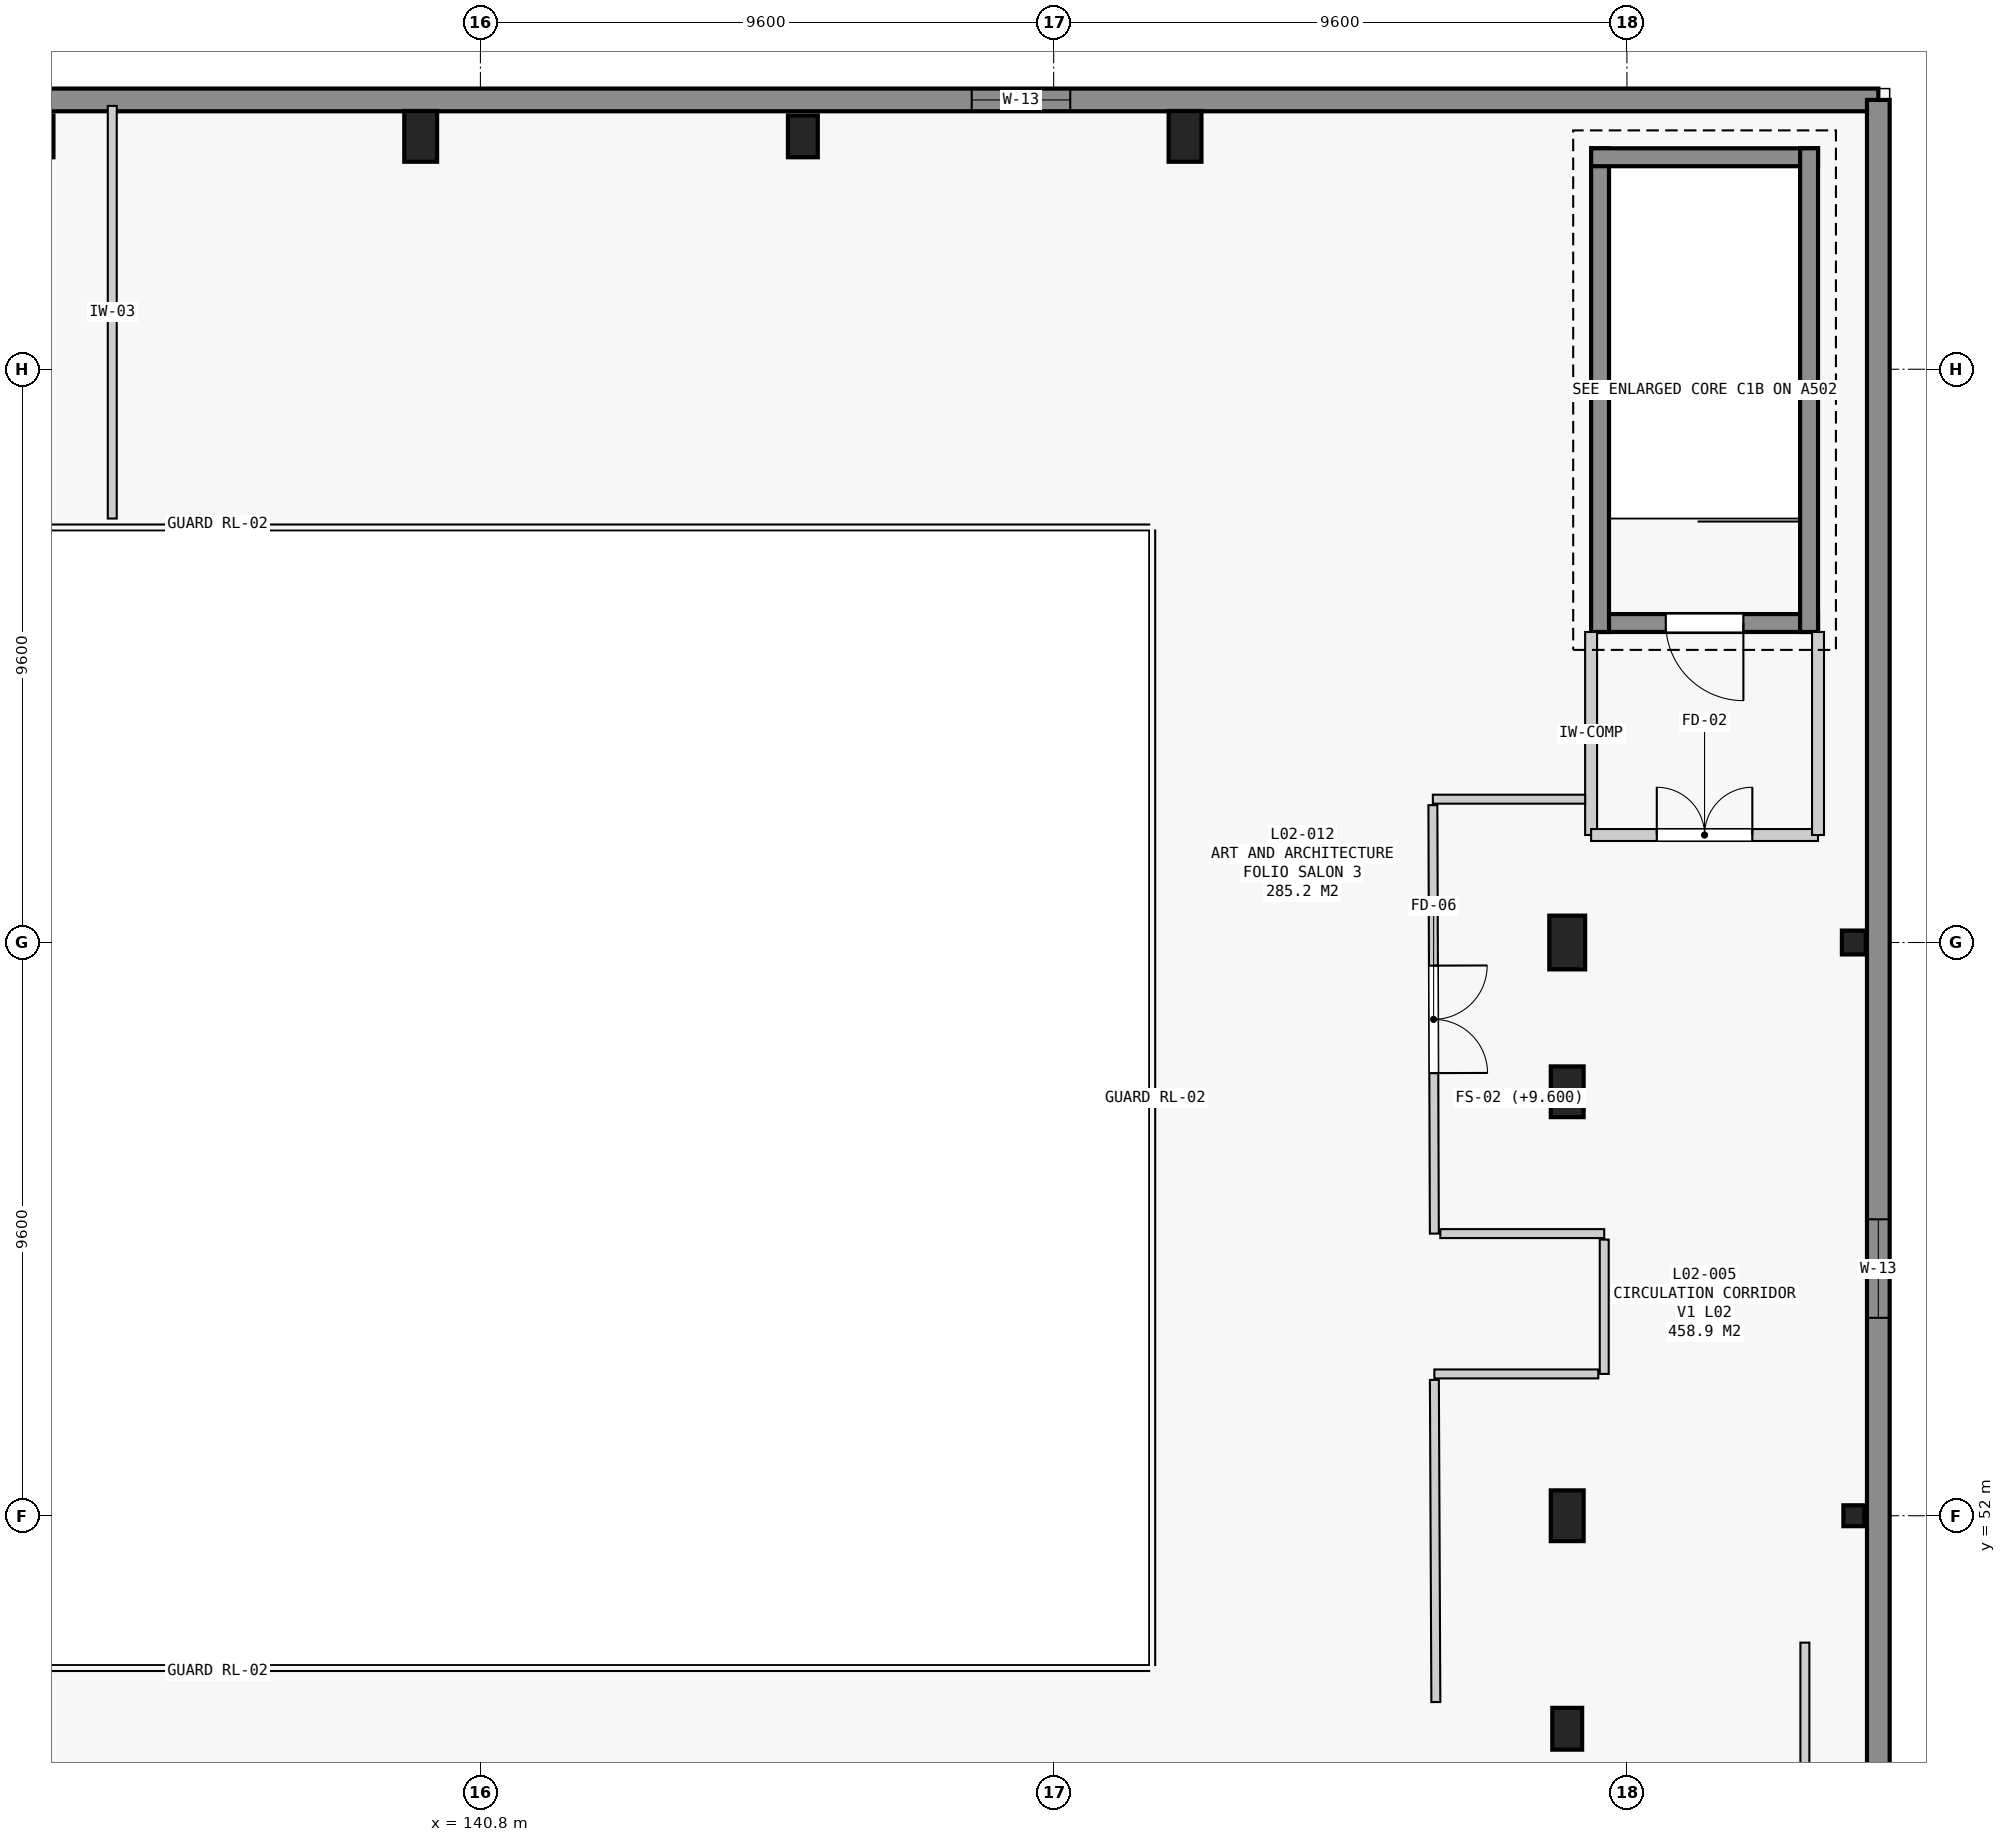
"""IFC4 building model, lengths in metres.
Left out: names, types, materials, properties, quantities, classifications, styles, units other than length and angle.
Written with IfcOpenShell. Run it as: python <this file> out.ifc"""

import sys

from ifc_helpers import new_model, si_unit, direction, frame, frame_2d, origin, origin_2d, place, context, subcontext, project, spatial, rectangle, extrude, element, fill, save


model = new_model("IFC4")
c1 = context("Model", 3, precision=1e-05, world=origin(), true_north=direction((0.0, 1.0)))
c2 = subcontext(c1, "Body", "Model", "MODEL_VIEW")
j1 = project(units=[si_unit("LENGTHUNIT", "METRE"), si_unit("PLANEANGLEUNIT", "RADIAN")], contexts=[c1])
p1 = place(None, origin())
s1 = spatial("IfcSite", under=j1, at=p1, CompositionType="ELEMENT")
p2 = place(p1, origin())
s2 = spatial("IfcBuilding", under=s1, at=p2, CompositionType="ELEMENT")
p3 = place(p2, frame((0.0, 0.0, 9.6)))
s3 = spatial("IfcBuildingStorey", under=s2, at=p3, CompositionType="ELEMENT", Elevation=9.6)
p4 = place(p3, frame((159.0, 52.0, 0.0), z_axis=(0.0, 0.0, 1.0), x_axis=(1.0, 0.0, 0.0)))
e1 = element("IfcColumn", 1, at=p4, inside=s3, PredefinedType="COLUMN", context=c2, shape_type="SweptSolid", body=[
    extrude(rectangle(XDim=0.55, YDim=0.85, at=origin_2d()), origin(), (0.0, 0.0, 1.0), 4.6),
])
p5 = place(p3, frame((159.0, 61.6, 0.0), z_axis=(0.0, 0.0, 1.0), x_axis=(1.0, 0.0, 0.0)))
e2 = element("IfcColumn", 2, at=p5, inside=s3, PredefinedType="COLUMN", context=c2, shape_type="SweptSolid", body=[
    extrude(rectangle(XDim=0.6, YDim=0.9, at=origin_2d()), origin(), (0.0, 0.0, 1.0), 4.6),
])
p6 = place(p3, frame((163.8, 52.0, 0.0), z_axis=(0.0, 0.0, 1.0), x_axis=(1.0, 0.0, 0.0)))
e3 = element("IfcColumn", 3, at=p6, inside=s3, PredefinedType="COLUMN", context=c2, shape_type="SweptSolid", body=[
    extrude(rectangle(XDim=0.35, YDim=0.35, at=origin_2d()), origin(), (0.0, 0.0, 1.0), 4.2),
])
p7 = place(p3, frame((163.8, 61.6, 0.0), z_axis=(0.0, 0.0, 1.0), x_axis=(1.0, 0.0, 0.0)))
e4 = element("IfcColumn", 4, at=p7, inside=s3, PredefinedType="COLUMN", context=c2, shape_type="SweptSolid", body=[
    extrude(rectangle(XDim=0.4, YDim=0.4, at=origin_2d()), origin(), (0.0, 0.0, 1.0), 4.2),
])
p8 = place(p3, frame((133.4, 75.1, 0.0), z_axis=(0.0, 0.0, 1.0), x_axis=(1.0, 0.0, 0.0)))
e5 = element("IfcColumn", 5, at=p8, inside=s3, PredefinedType="COLUMN", context=c2, shape_type="SweptSolid", body=[
    extrude(rectangle(XDim=0.5, YDim=0.7, at=origin_2d()), origin(), (0.0, 0.0, 1.0), 4.6),
])
p9 = place(p3, frame((139.8, 75.1, 0.0), z_axis=(0.0, 0.0, 1.0), x_axis=(1.0, 0.0, 0.0)))
e6 = element("IfcColumn", 6, at=p9, inside=s3, PredefinedType="COLUMN", context=c2, shape_type="SweptSolid", body=[
    extrude(rectangle(XDim=0.55, YDim=0.85, at=origin_2d()), origin(), (0.0, 0.0, 1.0), 4.6),
])
p10 = place(p3, frame((146.2, 75.1, 0.0), z_axis=(0.0, 0.0, 1.0), x_axis=(1.0, 0.0, 0.0)))
e7 = element("IfcColumn", 7, at=p10, inside=s3, PredefinedType="COLUMN", context=c2, shape_type="SweptSolid", body=[
    extrude(rectangle(XDim=0.5, YDim=0.7, at=origin_2d()), origin(), (0.0, 0.0, 1.0), 4.6),
])
p11 = place(p3, frame((152.6, 75.1, 0.0), z_axis=(0.0, 0.0, 1.0), x_axis=(1.0, 0.0, 0.0)))
e8 = element("IfcColumn", 8, at=p11, inside=s3, PredefinedType="COLUMN", context=c2, shape_type="SweptSolid", body=[
    extrude(rectangle(XDim=0.55, YDim=0.85, at=origin_2d()), origin(), (0.0, 0.0, 1.0), 4.6),
])
p12 = place(p3, frame((159.0, 48.433, 0.0), z_axis=(0.0, 0.0, 1.0), x_axis=(1.0, 0.0, 0.0)))
e9 = element("IfcColumn", 9, at=p12, inside=s3, PredefinedType="COLUMN", context=c2, shape_type="SweptSolid", body=[
    extrude(rectangle(XDim=0.5, YDim=0.7, at=origin_2d()), origin(), (0.0, 0.0, 1.0), 4.6),
])
p13 = place(p3, frame((159.0, 59.1, 0.0), z_axis=(0.0, 0.0, 1.0), x_axis=(1.0, 0.0, 0.0)))
e10 = element("IfcColumn", 10, at=p13, inside=s3, PredefinedType="COLUMN", context=c2, shape_type="SweptSolid", body=[
    extrude(rectangle(XDim=0.55, YDim=0.85, at=origin_2d()), origin(), (0.0, 0.0, 1.0), 4.6),
])
p14 = place(p3, frame((114.923, 75.71, 0.0), z_axis=(0.0, 0.0, 1.0), x_axis=(1.0, 0.0, 0.0)))
e11 = element("IfcWall", 11, at=p14, inside=s3, PredefinedType="STANDARD", context=c2, shape_type="SweptSolid", body=[
    extrude(rectangle(XDim=49.287, YDim=0.38, at=frame_2d((24.644, 0.0))), origin(), (0.0, 0.0, 1.0), 3.5),
])
p15 = place(p14, frame((13.158, 0.0, 1.32)))
e12 = element("IfcOpeningElement", 12, at=p15, cuts=e11, PredefinedType="OPENING", context=c2, shape_type="SweptSolid", body=[
    extrude(rectangle(XDim=2.4, YDim=1.8, at=frame_2d((1.2, 0.9))), frame((0.0, 0.2, 0.0), z_axis=(0.0, -1.0, 0.0), x_axis=(1.0, 0.0, 0.0)), (0.0, 0.0, 1.0), 0.4),
])
p16 = place(p14, frame((34.104, 0.0, 0.92)))
e13 = element("IfcOpeningElement", 13, at=p16, cuts=e11, PredefinedType="OPENING", context=c2, shape_type="SweptSolid", body=[
    extrude(rectangle(XDim=1.65, YDim=2.2, at=frame_2d((0.825, 1.1))), frame((0.0, 0.2, 0.0), z_axis=(0.0, -1.0, 0.0), x_axis=(1.0, 0.0, 0.0)), (0.0, 0.0, 1.0), 0.4),
])
p17 = place(p3, frame((164.21, 75.71, 0.0), z_axis=(0.0, 0.0, 1.0), x_axis=(0.0, -1.0, 0.0)))
e14 = element("IfcWall", 14, at=p17, inside=s3, PredefinedType="STANDARD", context=c2, shape_type="SweptSolid", body=[
    extrude(rectangle(XDim=33.02, YDim=0.38, at=frame_2d((16.51, 0.0))), origin(), (0.0, 0.0, 1.0), 3.94),
])
p18 = place(p17, frame((18.745, 0.0, 1.05)))
e15 = element("IfcOpeningElement", 15, at=p18, cuts=e14, PredefinedType="OPENING", context=c2, shape_type="SweptSolid", body=[
    extrude(rectangle(XDim=1.65, YDim=2.2, at=frame_2d((0.825, 1.1))), frame((0.0, 0.2, 0.0), z_axis=(0.0, -1.0, 0.0), x_axis=(1.0, 0.0, 0.0)), (0.0, 0.0, 1.0), 0.4),
])
p19 = place(p3, frame((163.2, 66.95, 0.0), z_axis=(0.0, 0.0, 1.0), x_axis=(-1.0, 0.0, 0.0)))
e16 = element("IfcWall", 16, at=p19, inside=s3, PredefinedType="SHEAR", context=c2, shape_type="SweptSolid", body=[
    extrude(rectangle(XDim=3.8, YDim=0.3, at=frame_2d((1.9, 0.0))), origin(), (0.0, 0.0, 1.0), 4.2),
])
p20 = place(p19, frame((1.25, 0.0, 0.0)))
e17 = element("IfcOpeningElement", 17, at=p20, cuts=e16, PredefinedType="OPENING", context=c2, shape_type="SweptSolid", body=[
    extrude(rectangle(XDim=1.3, YDim=2.2, at=frame_2d((0.65, 1.1))), frame((0.0, 0.16, 0.0), z_axis=(0.0, -1.0, 0.0), x_axis=(1.0, 0.0, 0.0)), (0.0, 0.0, 1.0), 0.32),
])
p21 = place(p3, frame((159.55, 66.8, 0.0), z_axis=(0.0, 0.0, 1.0), x_axis=(0.0, 1.0, 0.0)))
e18 = element("IfcWall", 18, at=p21, inside=s3, PredefinedType="SHEAR", context=c2, shape_type="SweptSolid", body=[
    extrude(rectangle(XDim=8.1, YDim=0.3, at=frame_2d((4.05, 0.0))), origin(), (0.0, 0.0, 1.0), 4.2),
])
p22 = place(p3, frame((159.4, 74.75, 0.0), z_axis=(0.0, 0.0, 1.0), x_axis=(1.0, 0.0, 0.0)))
e19 = element("IfcWall", 19, at=p22, inside=s3, PredefinedType="SHEAR", context=c2, shape_type="SweptSolid", body=[
    extrude(rectangle(XDim=3.8, YDim=0.3, at=frame_2d((1.9, 0.0))), origin(), (0.0, 0.0, 1.0), 4.2),
])
p23 = place(p3, frame((163.05, 74.9, 0.0), z_axis=(0.0, 0.0, 1.0), x_axis=(0.0, -1.0, 0.0)))
e20 = element("IfcWall", 20, at=p23, inside=s3, PredefinedType="SHEAR", context=c2, shape_type="SweptSolid", body=[
    extrude(rectangle(XDim=8.1, YDim=0.3, at=frame_2d((4.05, 0.0))), origin(), (0.0, 0.0, 1.0), 4.2),
])
p24 = place(p3, frame((159.4, 66.8, 0.0), z_axis=(0.0, 0.0, 1.0), x_axis=(0.0, -1.0, 0.0)))
e21 = element("IfcWall", 21, at=p24, inside=s3, PredefinedType="STANDARD", context=c2, shape_type="SweptSolid", body=[
    extrude(rectangle(XDim=3.4, YDim=0.2, at=frame_2d((1.7, 0.0))), origin(), (0.0, 0.0, 1.0), 4.2),
])
p25 = place(p3, frame((159.4, 63.4, 0.0), z_axis=(0.0, 0.0, 1.0), x_axis=(1.0, 0.0, 0.0)))
e22 = element("IfcWall", 22, at=p25, inside=s3, PredefinedType="STANDARD", context=c2, shape_type="SweptSolid", body=[
    extrude(rectangle(XDim=3.8, YDim=0.2, at=frame_2d((1.9, 0.0))), origin(), (0.0, 0.0, 1.0), 4.2),
])
p26 = place(p25, frame((1.1, 0.0, 0.0)))
e23 = element("IfcOpeningElement", 23, at=p26, cuts=e22, PredefinedType="OPENING", context=c2, shape_type="SweptSolid", body=[
    extrude(rectangle(XDim=1.6, YDim=2.2, at=frame_2d((0.8, 1.1))), frame((0.0, 0.11, 0.0), z_axis=(0.0, -1.0, 0.0), x_axis=(1.0, 0.0, 0.0)), (0.0, 0.0, 1.0), 0.22),
])
p27 = place(p3, frame((163.2, 63.4, 0.0), z_axis=(0.0, 0.0, 1.0), x_axis=(0.0, 1.0, 0.0)))
e24 = element("IfcWall", 24, at=p27, inside=s3, PredefinedType="STANDARD", context=c2, shape_type="SweptSolid", body=[
    extrude(rectangle(XDim=3.4, YDim=0.2, at=frame_2d((1.7, 0.0))), origin(), (0.0, 0.0, 1.0), 4.2),
])
p28 = place(p3, frame((134.635, 75.61, 0.0), z_axis=(0.0, 0.0, 1.0), x_axis=(0.0, -1.0, 0.0)))
e25 = element("IfcWall", 25, at=p28, inside=s3, PredefinedType="PARTITIONING", context=c2, shape_type="SweptSolid", body=[
    extrude(rectangle(XDim=6.91, YDim=0.15, at=frame_2d((3.455, 0.0))), origin(), (0.0, 0.0, 1.0), 3.94),
])
p29 = place(p3, frame((159.3, 64.0, 0.0), z_axis=(0.0, 0.0, 1.0), x_axis=(-1.0, 0.0, 0.0)))
e26 = element("IfcWall", 26, at=p29, inside=s3, PredefinedType="PARTITIONING", context=c2, shape_type="SweptSolid", body=[
    extrude(rectangle(XDim=2.55, YDim=0.15, at=frame_2d((1.275, 0.0))), origin(), (0.0, 0.0, 1.0), 3.94),
])
p30 = place(p3, frame((156.75, 63.9, 0.0), z_axis=(0.0, 0.0, 1.0), x_axis=(0.003436756619, -0.999994094335, 0.0)))
e27 = element("IfcWall", 27, at=p30, inside=s3, PredefinedType="PARTITIONING", context=c2, shape_type="SweptSolid", body=[
    extrude(rectangle(XDim=7.175, YDim=0.15, at=frame_2d((3.587, 0.0))), origin(), (0.0, 0.0, 1.0), 3.94),
])
p31 = place(p30, frame((2.688, 0.0, 0.0)))
e28 = element("IfcOpeningElement", 28, at=p31, cuts=e27, PredefinedType="OPENING", context=c2, shape_type="SweptSolid", body=[
    extrude(rectangle(XDim=1.8, YDim=2.2, at=frame_2d((0.9, 1.1))), frame((0.0, 0.085, 0.0), z_axis=(0.0, -1.0, 0.0), x_axis=(1.0, 0.0, 0.0)), (0.0, 0.0, 1.0), 0.17),
])
p32 = place(p3, frame((156.875, 56.725, 0.0), z_axis=(0.0, 0.0, 1.0), x_axis=(1.0, 0.0, 0.0)))
e29 = element("IfcWall", 29, at=p32, inside=s3, PredefinedType="PARTITIONING", context=c2, shape_type="SweptSolid", body=[
    extrude(rectangle(XDim=2.745, YDim=0.15, at=frame_2d((1.373, 0.0))), origin(), (0.0, 0.0, 1.0), 3.94),
])
p33 = place(p3, frame((159.62, 56.625, 0.0), z_axis=(0.0, 0.0, 1.0), x_axis=(0.0, -1.0, 0.0)))
e30 = element("IfcWall", 30, at=p33, inside=s3, PredefinedType="PARTITIONING", context=c2, shape_type="SweptSolid", body=[
    extrude(rectangle(XDim=2.25, YDim=0.15, at=frame_2d((1.125, 0.0))), origin(), (0.0, 0.0, 1.0), 3.94),
])
p34 = place(p3, frame((159.52, 54.375, 0.0), z_axis=(0.0, 0.0, 1.0), x_axis=(-1.0, 0.0, 0.0)))
e31 = element("IfcWall", 31, at=p34, inside=s3, PredefinedType="PARTITIONING", context=c2, shape_type="SweptSolid", body=[
    extrude(rectangle(XDim=2.745, YDim=0.15, at=frame_2d((1.373, 0.0))), origin(), (0.0, 0.0, 1.0), 3.94),
])
p35 = place(p3, frame((156.775, 54.275, 0.0), z_axis=(0.0, 0.0, 1.0), x_axis=(0.004570501633, -0.999989555203, 0.0)))
e32 = element("IfcWall", 32, at=p35, inside=s3, PredefinedType="PARTITIONING", context=c2, shape_type="SweptSolid", body=[
    extrude(rectangle(XDim=5.395, YDim=0.15, at=frame_2d((2.698, 0.0))), origin(), (0.0, 0.0, 1.0), 3.94),
])
p36 = place(p3, frame((162.98, 45.52, 0.0), z_axis=(0.0, 0.0, 1.0), x_axis=(0.0, 1.0, 0.0)))
e33 = element("IfcWall", 33, at=p36, inside=s3, PredefinedType="PARTITIONING", context=c2, shape_type="SweptSolid", body=[
    extrude(rectangle(XDim=4.355, YDim=0.15, at=frame_2d((2.177, 0.0))), origin(), (0.0, 0.0, 1.0), 3.94),
])
p37 = place(p16, origin())
e34 = element("IfcWindow", 34, at=p37, inside=s3, PartitioningType="SINGLE_PANEL", PredefinedType="WINDOW", context=c2, shape_type="SweptSolid", body=[
    extrude(rectangle(XDim=1.65, YDim=2.2, at=frame_2d((0.825, 1.1))), frame((0.0, 0.03, 0.0), z_axis=(0.0, -1.0, 0.0), x_axis=(1.0, 0.0, 0.0)), (0.0, 0.0, 1.0), 0.06),
])
fill(e13, e34)
p38 = place(p18, origin())
e35 = element("IfcWindow", 35, at=p38, inside=s3, PartitioningType="SINGLE_PANEL", PredefinedType="WINDOW", context=c2, shape_type="SweptSolid", body=[
    extrude(rectangle(XDim=1.65, YDim=2.2, at=frame_2d((0.825, 1.1))), frame((0.0, 0.03, 0.0), z_axis=(0.0, -1.0, 0.0), x_axis=(1.0, 0.0, 0.0)), (0.0, 0.0, 1.0), 0.06),
])
fill(e15, e35)
p39 = place(p20, origin())
e36 = element("IfcDoor", 36, at=p39, inside=s3, OperationType="SINGLE_SWING_LEFT", PredefinedType="DOOR", context=c2, shape_type="SweptSolid", body=[
    extrude(rectangle(XDim=1.3, YDim=2.2, at=frame_2d((0.65, 1.1))), frame((0.0, 0.025, 0.0), z_axis=(0.0, -1.0, 0.0), x_axis=(1.0, 0.0, 0.0)), (0.0, 0.0, 1.0), 0.05),
])
fill(e17, e36)
p40 = place(p26, origin())
e37 = element("IfcDoor", 37, at=p40, inside=s3, OperationType="DOUBLE_DOOR_SINGLE_SWING", PredefinedType="DOOR", context=c2, shape_type="SweptSolid", body=[
    extrude(rectangle(XDim=1.6, YDim=2.2, at=frame_2d((0.8, 1.1))), frame((0.0, 0.025, 0.0), z_axis=(0.0, -1.0, 0.0), x_axis=(1.0, 0.0, 0.0)), (0.0, 0.0, 1.0), 0.05),
])
fill(e23, e37)
p41 = place(p31, origin())
e38 = element("IfcDoor", 38, at=p41, inside=s3, OperationType="DOUBLE_DOOR_SINGLE_SWING", PredefinedType="DOOR", context=c2, shape_type="SweptSolid", body=[
    extrude(rectangle(XDim=1.8, YDim=2.2, at=frame_2d((0.9, 1.1))), frame((0.0, 0.025, 0.0), z_axis=(0.0, -1.0, 0.0), x_axis=(1.0, 0.0, 0.0)), (0.0, 0.0, 1.0), 0.05),
])
fill(e28, e38)
save(model, sys.argv[1])
